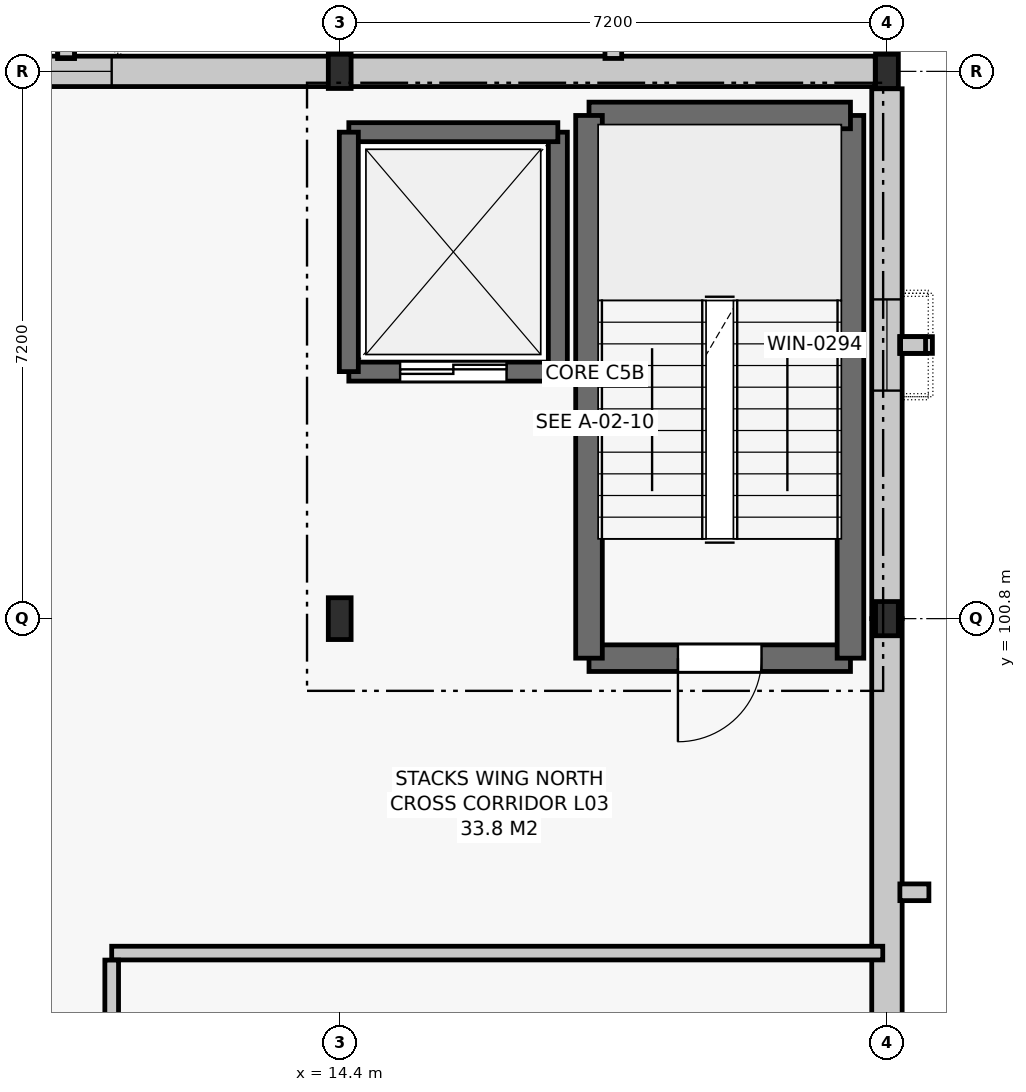
"""IFC4 building model, lengths in metres.
Left out: names, types, materials, properties, quantities, classifications, styles, units other than length and angle.
Written with IfcOpenShell. Run it as: python <this file> out.ifc"""

import sys

from ifc_helpers import new_model, si_unit, direction, frame, frame_2d, origin, origin_2d, place, context, subcontext, project, spatial, rectangle, i_section, extrude, element, fill, save


model = new_model("IFC4")
c1 = context("Model", 3, precision=1e-05, world=origin(), true_north=direction((0.0, 1.0)))
c2 = subcontext(c1, "Body", "Model", "MODEL_VIEW")
j1 = project(units=[si_unit("LENGTHUNIT", "METRE"), si_unit("PLANEANGLEUNIT", "RADIAN")], contexts=[c1])
p1 = place(None, origin())
s1 = spatial("IfcSite", under=j1, at=p1, CompositionType="ELEMENT")
p2 = place(p1, origin())
s2 = spatial("IfcBuilding", under=s1, at=p2, CompositionType="ELEMENT")
p3 = place(p2, frame((0.0, 0.0, 14.4)))
s3 = spatial("IfcBuildingStorey", under=s2, at=p3, CompositionType="ELEMENT", Elevation=14.4)
p4 = place(p3, frame((14.4, 100.8, 0.0), z_axis=(0.0, 0.0, 1.0), x_axis=(1.0, 0.0, 0.0)))
e1 = element("IfcColumn", 1, at=p4, inside=s3, PredefinedType="COLUMN", context=c2, shape_type="SweptSolid", body=[
    extrude(i_section(OverallWidth=0.3, OverallDepth=0.55, WebThickness=0.015, FlangeThickness=0.029, FilletRadius=0.027, at=origin_2d()), origin(), (0.0, 0.0, 1.0), 4.2),
])
for number, where, z_axis, x_axis in (
    (2, (14.4, 108.0, 0.0), (0.0, 0.0, 1.0), (1.0, 0.0, 0.0)),
    (3, (21.6, 100.8, 0.0), (0.0, 0.0, 1.0), (1.0, 0.0, 0.0)),
    (4, (21.6, 108.0, 0.0), (0.0, 0.0, 1.0), (1.0, 0.0, 0.0)),
):
    element("IfcColumn", number, at=place(p3, frame(where, z_axis=z_axis, x_axis=x_axis)), inside=s3, PredefinedType="COLUMN", context=c2, shape_type="SweptSolid", body=[
        extrude(i_section(OverallWidth=0.3, OverallDepth=0.45, WebThickness=0.014, FlangeThickness=0.026, FilletRadius=0.027, at=origin_2d()), origin(), (0.0, 0.0, 1.0), 4.2),
    ])
p5 = place(p3, frame((21.6, 93.6, 0.0), z_axis=(0.0, 0.0, 1.0), x_axis=(0.0, 1.0, 0.0)))
e5 = element("IfcWall", 5, at=p5, inside=s3, PredefinedType="SOLIDWALL", context=c2, shape_type="SweptSolid", body=[
    extrude(rectangle(XDim=7.2, YDim=0.4, at=frame_2d((3.6, 0.0))), origin(), (0.0, 0.0, 1.0), 3.22),
])
p6 = place(p3, frame((21.6, 100.8, 0.0), z_axis=(0.0, 0.0, 1.0), x_axis=(0.0, 1.0, 0.0)))
e6 = element("IfcWall", 6, at=p6, inside=s3, PredefinedType="SOLIDWALL", context=c2, shape_type="SweptSolid", body=[
    extrude(rectangle(XDim=6.971, YDim=0.4, at=frame_2d((3.485, 0.0))), origin(), (0.0, 0.0, 1.0), 3.22),
])
p7 = place(p6, frame((3.0, 0.0, 0.95)))
e7 = element("IfcOpeningElement", 7, at=p7, cuts=e6, PredefinedType="OPENING", context=c2, shape_type="SweptSolid", body=[
    extrude(rectangle(XDim=1.2, YDim=2.15, at=frame_2d((0.6, 1.075))), frame((0.0, 0.212, 0.0), z_axis=(0.0, -1.0, 0.0), x_axis=(1.0, 0.0, 0.0)), (0.0, 0.0, 1.0), 0.424),
])
p8 = place(p3, frame((21.446, 108.0, 0.0), z_axis=(0.0, 0.0, 1.0), x_axis=(-1.0, 0.0, 0.0)))
e8 = element("IfcWall", 8, at=p8, inside=s3, PredefinedType="SOLIDWALL", context=c2, shape_type="SweptSolid", body=[
    extrude(rectangle(XDim=7.046, YDim=0.4, at=frame_2d((3.523, 0.0))), origin(), (0.0, 0.0, 1.0), 3.22),
])
p9 = place(p3, frame((14.4, 108.0, 0.0), z_axis=(0.0, 0.0, 1.0), x_axis=(-1.0, 0.0, 0.0)))
e9 = element("IfcWall", 9, at=p9, inside=s3, PredefinedType="SOLIDWALL", context=c2, shape_type="SweptSolid", body=[
    extrude(rectangle(XDim=7.2, YDim=0.4, at=frame_2d((3.6, 0.0))), origin(), (0.0, 0.0, 1.0), 3.22),
])
p10 = place(p9, frame((3.0, 0.0, 0.95)))
e10 = element("IfcOpeningElement", 10, at=p10, cuts=e9, PredefinedType="OPENING", context=c2, shape_type="SweptSolid", body=[
    extrude(rectangle(XDim=1.2, YDim=2.15, at=frame_2d((0.6, 1.075))), frame((0.0, 0.212, 0.0), z_axis=(0.0, -1.0, 0.0), x_axis=(1.0, 0.0, 0.0)), (0.0, 0.0, 1.0), 0.424),
])
p11 = place(p3, frame((17.68, 100.28, 0.0), z_axis=(0.0, 0.0, 1.0), x_axis=(1.0, 0.0, 0.0)))
e11 = element("IfcWall", 11, at=p11, inside=s3, PredefinedType="SHEAR", context=c2, shape_type="SweptSolid", body=[
    extrude(rectangle(XDim=3.44, YDim=0.35, at=frame_2d((1.72, 0.0))), origin(), (0.0, 0.0, 1.0), 3.94),
])
p12 = place(p11, frame((1.17, 0.0, 0.0)))
e12 = element("IfcOpeningElement", 12, at=p12, cuts=e11, PredefinedType="OPENING", context=c2, shape_type="SweptSolid", body=[
    extrude(rectangle(XDim=1.1, YDim=2.15, at=frame_2d((0.55, 1.075))), frame((0.0, 0.187, 0.0), z_axis=(0.0, -1.0, 0.0), x_axis=(1.0, 0.0, 0.0)), (0.0, 0.0, 1.0), 0.374),
])
p13 = place(p3, frame((21.12, 100.28, 0.0), z_axis=(0.0, 0.0, 1.0), x_axis=(0.0, 1.0, 0.0)))
e13 = element("IfcWall", 13, at=p13, inside=s3, PredefinedType="SHEAR", context=c2, shape_type="SweptSolid", body=[
    extrude(rectangle(XDim=7.14, YDim=0.35, at=frame_2d((3.57, 0.0))), origin(), (0.0, 0.0, 1.0), 3.94),
])
p14 = place(p3, frame((21.12, 107.42, 0.0), z_axis=(0.0, 0.0, 1.0), x_axis=(-1.0, 0.0, 0.0)))
e14 = element("IfcWall", 14, at=p14, inside=s3, PredefinedType="SHEAR", context=c2, shape_type="SweptSolid", body=[
    extrude(rectangle(XDim=3.44, YDim=0.35, at=frame_2d((1.72, 0.0))), origin(), (0.0, 0.0, 1.0), 3.94),
])
p15 = place(p3, frame((17.68, 107.42, 0.0), z_axis=(0.0, 0.0, 1.0), x_axis=(0.0, -1.0, 0.0)))
e15 = element("IfcWall", 15, at=p15, inside=s3, PredefinedType="SHEAR", context=c2, shape_type="SweptSolid", body=[
    extrude(rectangle(XDim=7.14, YDim=0.35, at=frame_2d((3.57, 0.0))), origin(), (0.0, 0.0, 1.0), 3.94),
])
p16 = place(p3, frame((14.52, 104.05, 0.0), z_axis=(0.0, 0.0, 1.0), x_axis=(1.0, 0.0, 0.0)))
e16 = element("IfcWall", 16, at=p16, inside=s3, PredefinedType="SHEAR", context=c2, shape_type="SweptSolid", body=[
    extrude(rectangle(XDim=2.75, YDim=0.25, at=frame_2d((1.375, 0.0))), origin(), (0.0, 0.0, 1.0), 3.94),
])
p17 = place(p16, frame((0.675, 0.0, 0.0)))
e17 = element("IfcOpeningElement", 17, at=p17, cuts=e16, PredefinedType="OPENING", context=c2, shape_type="SweptSolid", body=[
    extrude(rectangle(XDim=1.4, YDim=2.2, at=frame_2d((0.7, 1.1))), frame((0.0, 0.137, 0.0), z_axis=(0.0, -1.0, 0.0), x_axis=(1.0, 0.0, 0.0)), (0.0, 0.0, 1.0), 0.274),
])
p18 = place(p3, frame((17.27, 104.05, 0.0), z_axis=(0.0, 0.0, 1.0), x_axis=(0.0, 1.0, 0.0)))
e18 = element("IfcWall", 18, at=p18, inside=s3, PredefinedType="SHEAR", context=c2, shape_type="SweptSolid", body=[
    extrude(rectangle(XDim=3.15, YDim=0.25, at=frame_2d((1.575, 0.0))), origin(), (0.0, 0.0, 1.0), 3.94),
])
p19 = place(p3, frame((17.27, 107.2, 0.0), z_axis=(0.0, 0.0, 1.0), x_axis=(-1.0, 0.0, 0.0)))
e19 = element("IfcWall", 19, at=p19, inside=s3, PredefinedType="SHEAR", context=c2, shape_type="SweptSolid", body=[
    extrude(rectangle(XDim=2.75, YDim=0.25, at=frame_2d((1.375, 0.0))), origin(), (0.0, 0.0, 1.0), 3.94),
])
p20 = place(p3, frame((14.52, 107.2, 0.0), z_axis=(0.0, 0.0, 1.0), x_axis=(0.0, -1.0, 0.0)))
e20 = element("IfcWall", 20, at=p20, inside=s3, PredefinedType="SHEAR", context=c2, shape_type="SweptSolid", body=[
    extrude(rectangle(XDim=3.15, YDim=0.25, at=frame_2d((1.575, 0.0))), origin(), (0.0, 0.0, 1.0), 3.94),
])
p21 = place(p3, frame((11.4, 96.4, 0.0), z_axis=(0.0, 0.0, 1.0), x_axis=(1.0, 0.0, 0.0)))
e21 = element("IfcWall", 21, at=p21, inside=s3, PredefinedType="PARTITIONING", context=c2, shape_type="SweptSolid", body=[
    extrude(rectangle(XDim=10.145, YDim=0.18, at=frame_2d((5.073, 0.0))), origin(), (0.0, 0.0, 1.0), 3.325),
])
p22 = place(p3, frame((11.4, 72.112, 0.0), z_axis=(0.0, 0.0, 1.0), x_axis=(0.0, 1.0, 0.0)))
e22 = element("IfcWall", 22, at=p22, inside=s3, PredefinedType="PARTITIONING", context=c2, shape_type="SweptSolid", body=[
    extrude(rectangle(XDim=24.196, YDim=0.18, at=frame_2d((12.098, 0.0))), origin(), (0.0, 0.0, 1.0), 3.375),
])
p23 = place(p22, frame((11.273, 0.0, 0.0)))
e23 = element("IfcOpeningElement", 23, at=p23, cuts=e22, PredefinedType="OPENING", context=c2, shape_type="SweptSolid", body=[
    extrude(rectangle(XDim=1.65, YDim=2.25, at=frame_2d((0.825, 1.125))), frame((0.0, 0.102, 0.0), z_axis=(0.0, -1.0, 0.0), x_axis=(1.0, 0.0, 0.0)), (0.0, 0.0, 1.0), 0.204),
])
p24 = place(p7, origin())
e24 = element("IfcWindow", 24, at=p24, inside=s3, PartitioningType="SINGLE_PANEL", PredefinedType="WINDOW", context=c2, shape_type="SweptSolid", body=[
    extrude(rectangle(XDim=1.2, YDim=2.15, at=frame_2d((0.6, 1.075))), frame((0.0, 0.03, 0.0), z_axis=(0.0, -1.0, 0.0), x_axis=(1.0, 0.0, 0.0)), (0.0, 0.0, 1.0), 0.06),
])
fill(e7, e24)
p25 = place(p10, origin())
e25 = element("IfcWindow", 25, at=p25, inside=s3, PartitioningType="SINGLE_PANEL", PredefinedType="WINDOW", context=c2, shape_type="SweptSolid", body=[
    extrude(rectangle(XDim=1.2, YDim=2.15, at=frame_2d((0.6, 1.075))), frame((0.0, 0.03, 0.0), z_axis=(0.0, -1.0, 0.0), x_axis=(1.0, 0.0, 0.0)), (0.0, 0.0, 1.0), 0.06),
])
fill(e10, e25)
p26 = place(p12, frame((1.1, 0.0, 0.0), z_axis=(0.0, 0.0, 1.0), x_axis=(-1.0, 0.0, 0.0)))
e26 = element("IfcDoor", 26, at=p26, inside=s3, OperationType="SINGLE_SWING_RIGHT", PredefinedType="DOOR", context=c2, shape_type="SweptSolid", body=[
    extrude(rectangle(XDim=1.1, YDim=2.15, at=frame_2d((0.55, 1.075))), frame((0.0, 0.025, 0.0), z_axis=(0.0, -1.0, 0.0), x_axis=(1.0, 0.0, 0.0)), (0.0, 0.0, 1.0), 0.05),
])
fill(e12, e26)
p27 = place(p17, origin())
e27 = element("IfcDoor", 27, at=p27, inside=s3, OperationType="DOUBLE_DOOR_SLIDING", PredefinedType="DOOR", context=c2, shape_type="SweptSolid", body=[
    extrude(rectangle(XDim=1.4, YDim=2.2, at=frame_2d((0.7, 1.1))), frame((0.0, 0.025, 0.0), z_axis=(0.0, -1.0, 0.0), x_axis=(1.0, 0.0, 0.0)), (0.0, 0.0, 1.0), 0.05),
])
fill(e17, e27)
save(model, sys.argv[1])
